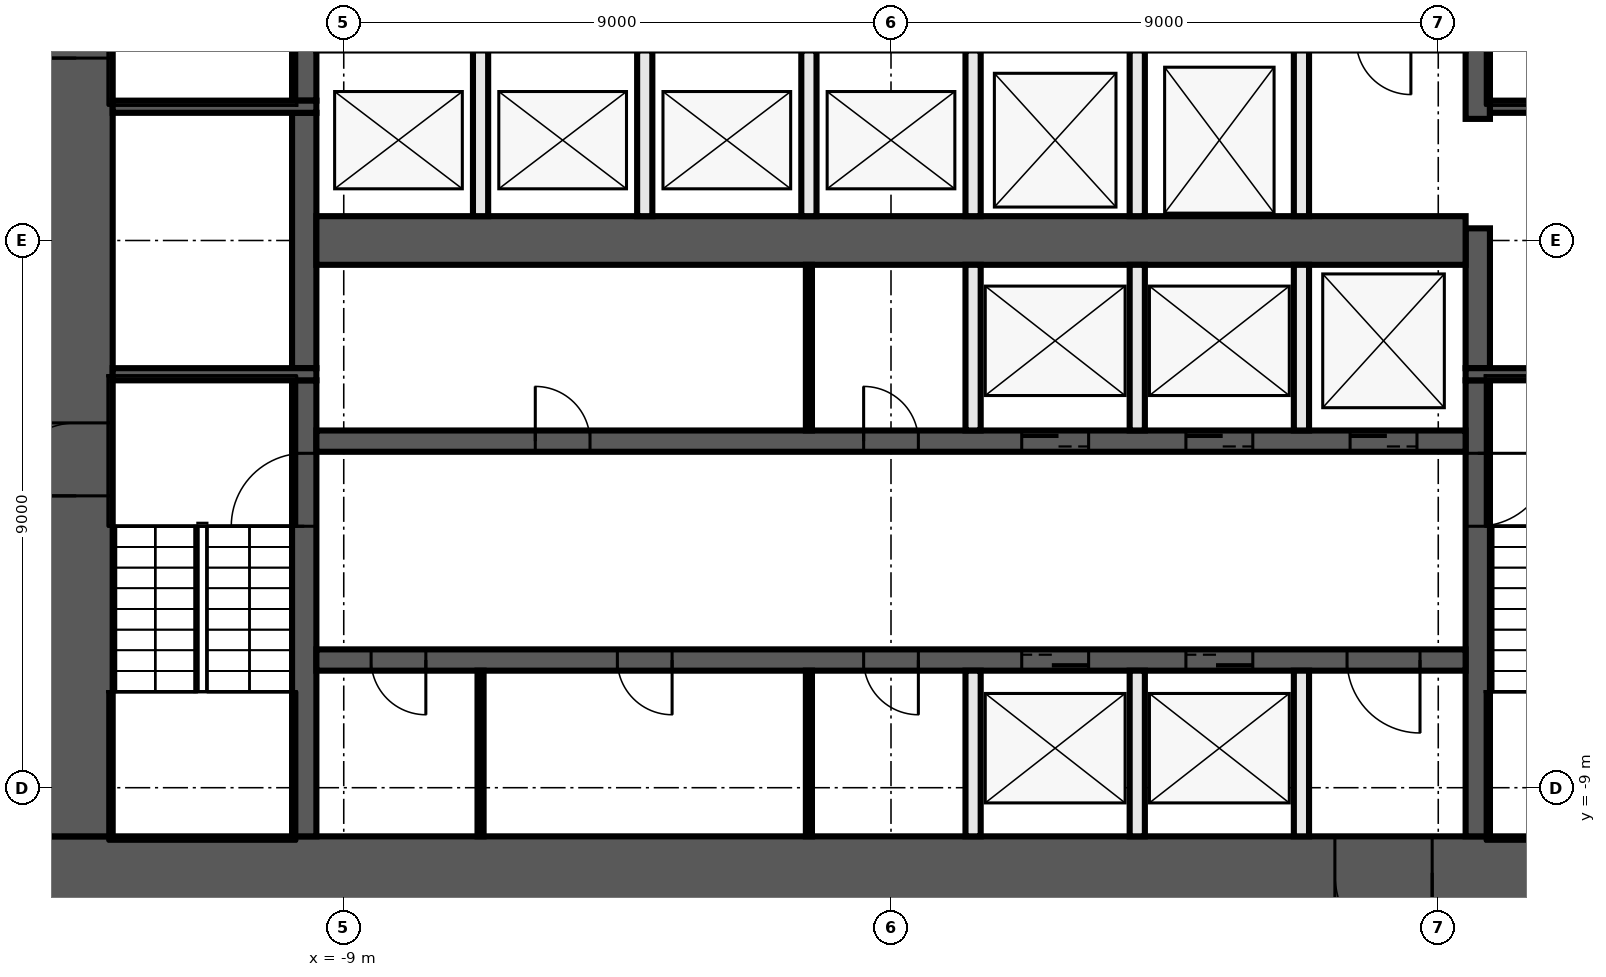
"""IFC4 building model, lengths in metres.
Left out: names, types, materials, properties, quantities, classifications, styles, units other than length and angle.
Written with IfcOpenShell. Run it as: python <this file> out.ifc"""

import sys

from ifc_helpers import new_model, si_unit, direction, frame, frame_2d, origin, place, context, subcontext, project, spatial, rectangle, extrude, element, fill, save


model = new_model("IFC4")
c1 = context("Model", 3, precision=1e-05, world=origin(), true_north=direction((0.0, 1.0)))
c2 = subcontext(c1, "Body", "Model", "MODEL_VIEW")
j1 = project(units=[si_unit("LENGTHUNIT", "METRE"), si_unit("PLANEANGLEUNIT", "RADIAN")], contexts=[c1])
p1 = place(None, origin())
s1 = spatial("IfcSite", under=j1, at=p1, CompositionType="ELEMENT")
p2 = place(p1, origin())
s2 = spatial("IfcBuilding", under=s1, at=p2, CompositionType="ELEMENT")
p3 = place(p2, origin())
s3 = spatial("IfcBuildingStorey", under=s2, at=p3, CompositionType="ELEMENT", Elevation=0.0)
p4 = place(p3, frame((14.0, -10.4, 0.0), z_axis=(0.0, 0.0, 1.0), x_axis=(-1.0, 0.0, 0.0)))
e1 = element("IfcWall", 1, at=p4, inside=s3, PredefinedType="SHEAR", context=c2, shape_type="SweptSolid", body=[
    extrude(rectangle(XDim=28.0, YDim=1.2, at=frame_2d((14.0, 0.0))), origin(), (0.0, 0.0, 1.0), 8.55),
])
p5 = place(p4, frame((5.1, 0.0, 0.0)))
e2 = element("IfcOpeningElement", 2, at=p5, cuts=e1, PredefinedType="OPENING", context=c2, shape_type="SweptSolid", body=[
    extrude(rectangle(XDim=1.6, YDim=2.1, at=frame_2d((0.8, 1.05))), frame((0.0, 0.61, 0.0), z_axis=(0.0, -1.0, 0.0), x_axis=(1.0, 0.0, 0.0)), (0.0, 0.0, 1.0), 1.22),
])
p6 = place(p3, frame((-13.4, -9.8, 0.0), z_axis=(0.0, 0.0, 1.0), x_axis=(0.0, 1.0, 0.0)))
e3 = element("IfcWall", 3, at=p6, inside=s3, PredefinedType="SHEAR", context=c2, shape_type="SweptSolid", body=[
    extrude(rectangle(XDim=19.6, YDim=1.2, at=frame_2d((9.8, 0.0))), origin(), (0.0, 0.0, 1.0), 8.55),
])
p7 = place(p6, frame((12.8, 0.0, 0.0)))
e4 = element("IfcOpeningElement", 4, at=p7, cuts=e3, PredefinedType="OPENING", context=c2, shape_type="SweptSolid", body=[
    extrude(rectangle(XDim=1.2, YDim=2.1, at=frame_2d((0.6, 1.05))), frame((0.0, 0.61, 0.0), z_axis=(0.0, -1.0, 0.0), x_axis=(1.0, 0.0, 0.0)), (0.0, 0.0, 1.0), 1.22),
])
p8 = place(p6, frame((5.6, 0.0, 0.0)))
e5 = element("IfcOpeningElement", 5, at=p8, cuts=e3, PredefinedType="OPENING", context=c2, shape_type="SweptSolid", body=[
    extrude(rectangle(XDim=1.2, YDim=2.1, at=frame_2d((0.6, 1.05))), frame((0.0, 0.61, 0.0), z_axis=(0.0, -1.0, 0.0), x_axis=(1.0, 0.0, 0.0)), (0.0, 0.0, 1.0), 1.22),
])
p9 = place(p3, frame((9.65, -2.3, 0.0), z_axis=(0.0, 0.0, 1.0), x_axis=(0.0, -1.0, 0.0)))
e6 = element("IfcWall", 6, at=p9, inside=s3, PredefinedType="SHEAR", context=c2, shape_type="SweptSolid", body=[
    extrude(rectangle(XDim=7.5, YDim=0.4, at=frame_2d((3.75, 0.0))), origin(), (0.0, 0.0, 1.0), 8.55),
])
p10 = place(p9, frame((1.2, 0.0, 0.0)))
e7 = element("IfcOpeningElement", 7, at=p10, cuts=e6, PredefinedType="OPENING", context=c2, shape_type="SweptSolid", body=[
    extrude(rectangle(XDim=1.2, YDim=2.1, at=frame_2d((0.6, 1.05))), frame((0.0, 0.21, 0.0), z_axis=(0.0, -1.0, 0.0), x_axis=(1.0, 0.0, 0.0)), (0.0, 0.0, 1.0), 0.42),
])
p11 = place(p3, frame((9.65, -2.1, 0.0), z_axis=(0.0, 0.0, 1.0), x_axis=(0.0, 1.0, 0.0)))
e8 = element("IfcWall", 8, at=p11, inside=s3, PredefinedType="SHEAR", context=c2, shape_type="SweptSolid", body=[
    extrude(rectangle(XDim=2.3, YDim=0.4, at=frame_2d((1.15, 0.0))), origin(), (0.0, 0.0, 1.0), 8.55),
])
p12 = place(p3, frame((9.65, 9.8, 0.0), z_axis=(0.0, 0.0, 1.0), x_axis=(0.0, -1.0, 0.0)))
e9 = element("IfcWall", 9, at=p12, inside=s3, PredefinedType="SHEAR", context=c2, shape_type="SweptSolid", body=[
    extrude(rectangle(XDim=7.8, YDim=0.4, at=frame_2d((3.9, 0.0))), origin(), (0.0, 0.0, 1.0), 8.55),
])
p13 = place(p12, frame((5.1, 0.0, 0.0)))
e10 = element("IfcOpeningElement", 10, at=p13, cuts=e9, PredefinedType="OPENING", context=c2, shape_type="SweptSolid", body=[
    extrude(rectangle(XDim=1.2, YDim=2.1, at=frame_2d((0.6, 1.05))), frame((0.0, 0.21, 0.0), z_axis=(0.0, -1.0, 0.0), x_axis=(1.0, 0.0, 0.0)), (0.0, 0.0, 1.0), 0.42),
])
p14 = place(p3, frame((-9.65, -9.8, 0.0), z_axis=(0.0, 0.0, 1.0), x_axis=(0.0, 1.0, 0.0)))
e11 = element("IfcWall", 11, at=p14, inside=s3, PredefinedType="SHEAR", context=c2, shape_type="SweptSolid", body=[
    extrude(rectangle(XDim=7.5, YDim=0.4, at=frame_2d((3.75, 0.0))), origin(), (0.0, 0.0, 1.0), 8.55),
])
p15 = place(p14, frame((5.1, 0.0, 0.0)))
e12 = element("IfcOpeningElement", 12, at=p15, cuts=e11, PredefinedType="OPENING", context=c2, shape_type="SweptSolid", body=[
    extrude(rectangle(XDim=1.2, YDim=2.1, at=frame_2d((0.6, 1.05))), frame((0.0, 0.21, 0.0), z_axis=(0.0, -1.0, 0.0), x_axis=(1.0, 0.0, 0.0)), (0.0, 0.0, 1.0), 0.42),
])
p16 = place(p3, frame((-9.65, -2.1, 0.0), z_axis=(0.0, 0.0, 1.0), x_axis=(0.0, 1.0, 0.0)))
e13 = element("IfcWall", 13, at=p16, inside=s3, PredefinedType="SHEAR", context=c2, shape_type="SweptSolid", body=[
    extrude(rectangle(XDim=4.2, YDim=0.4, at=frame_2d((2.1, 0.0))), origin(), (0.0, 0.0, 1.0), 8.55),
])
p17 = place(p3, frame((-9.65, 2.3, 0.0), z_axis=(0.0, 0.0, 1.0), x_axis=(0.0, 1.0, 0.0)))
e14 = element("IfcWall", 14, at=p17, inside=s3, PredefinedType="SHEAR", context=c2, shape_type="SweptSolid", body=[
    extrude(rectangle(XDim=7.5, YDim=0.4, at=frame_2d((3.75, 0.0))), origin(), (0.0, 0.0, 1.0), 8.55),
])
p18 = place(p17, frame((1.2, 0.0, 0.0)))
e15 = element("IfcOpeningElement", 15, at=p18, cuts=e14, PredefinedType="OPENING", context=c2, shape_type="SweptSolid", body=[
    extrude(rectangle(XDim=1.2, YDim=2.1, at=frame_2d((0.6, 1.05))), frame((0.0, 0.21, 0.0), z_axis=(0.0, -1.0, 0.0), x_axis=(1.0, 0.0, 0.0)), (0.0, 0.0, 1.0), 0.42),
])
p19 = place(p3, frame((9.85, 2.2, 0.0), z_axis=(0.0, 0.0, 1.0), x_axis=(1.0, 0.0, 0.0)))
e16 = element("IfcWall", 16, at=p19, inside=s3, PredefinedType="SHEAR", context=c2, shape_type="SweptSolid", body=[
    extrude(rectangle(XDim=2.95, YDim=0.2, at=frame_2d((1.475, 0.0))), origin(), (0.0, 0.0, 1.0), 8.55),
])
for number, where, z_axis, x_axis in (
    (17, (-9.45, 2.2, 0.0), (0.0, 0.0, 1.0), (-1.0, 0.0, 0.0)),
    (18, (9.45, -2.2, 0.0), (0.0, 0.0, 1.0), (1.0, 0.0, 0.0)),
    (19, (-9.45, -2.2, 0.0), (0.0, 0.0, 1.0), (-1.0, 0.0, 0.0)),
):
    element("IfcWall", number, at=place(p3, frame(where, z_axis=z_axis, x_axis=x_axis)), inside=s3, PredefinedType="SHEAR", context=c2, shape_type="SweptSolid", body=[
        extrude(rectangle(XDim=3.35, YDim=0.2, at=frame_2d((1.675, 0.0))), origin(), (0.0, 0.0, 1.0), 8.55),
    ])
p20 = place(p3, frame((-9.45, -3.3, 0.0), z_axis=(0.0, 0.0, 1.0), x_axis=(1.0, 0.0, 0.0)))
e20 = element("IfcWall", 20, at=p20, inside=s3, PredefinedType="SHEAR", context=c2, shape_type="SweptSolid", body=[
    extrude(rectangle(XDim=18.9, YDim=0.35, at=frame_2d((9.45, 0.0))), origin(), (0.0, 0.0, 1.0), 8.55),
])
p21 = place(p20, frame((11.6, 0.0, 0.0)))
e21 = element("IfcOpeningElement", 21, at=p21, cuts=e20, PredefinedType="OPENING", context=c2, shape_type="SweptSolid", body=[
    extrude(rectangle(XDim=1.1, YDim=2.1, at=frame_2d((0.55, 1.05))), frame((0.0, 0.185, 0.0), z_axis=(0.0, -1.0, 0.0), x_axis=(1.0, 0.0, 0.0)), (0.0, 0.0, 1.0), 0.37),
])
p22 = place(p20, frame((14.3, 0.0, 0.0)))
e22 = element("IfcOpeningElement", 22, at=p22, cuts=e20, PredefinedType="OPENING", context=c2, shape_type="SweptSolid", body=[
    extrude(rectangle(XDim=1.1, YDim=2.1, at=frame_2d((0.55, 1.05))), frame((0.0, 0.185, 0.0), z_axis=(0.0, -1.0, 0.0), x_axis=(1.0, 0.0, 0.0)), (0.0, 0.0, 1.0), 0.37),
])
p23 = place(p20, frame((17.0, 0.0, 0.0)))
e23 = element("IfcOpeningElement", 23, at=p23, cuts=e20, PredefinedType="OPENING", context=c2, shape_type="SweptSolid", body=[
    extrude(rectangle(XDim=1.1, YDim=2.1, at=frame_2d((0.55, 1.05))), frame((0.0, 0.185, 0.0), z_axis=(0.0, -1.0, 0.0), x_axis=(1.0, 0.0, 0.0)), (0.0, 0.0, 1.0), 0.37),
])
p24 = place(p20, frame((3.6, 0.0, 0.0)))
e24 = element("IfcOpeningElement", 24, at=p24, cuts=e20, PredefinedType="OPENING", context=c2, shape_type="SweptSolid", body=[
    extrude(rectangle(XDim=0.9, YDim=2.1, at=frame_2d((0.45, 1.05))), frame((0.0, 0.185, 0.0), z_axis=(0.0, -1.0, 0.0), x_axis=(1.0, 0.0, 0.0)), (0.0, 0.0, 1.0), 0.37),
])
p25 = place(p20, frame((9.0, 0.0, 0.0)))
e25 = element("IfcOpeningElement", 25, at=p25, cuts=e20, PredefinedType="OPENING", context=c2, shape_type="SweptSolid", body=[
    extrude(rectangle(XDim=0.9, YDim=2.1, at=frame_2d((0.45, 1.05))), frame((0.0, 0.185, 0.0), z_axis=(0.0, -1.0, 0.0), x_axis=(1.0, 0.0, 0.0)), (0.0, 0.0, 1.0), 0.37),
])
p26 = place(p3, frame((9.45, -6.9, 0.0), z_axis=(0.0, 0.0, 1.0), x_axis=(-1.0, 0.0, 0.0)))
e26 = element("IfcWall", 26, at=p26, inside=s3, PredefinedType="SHEAR", context=c2, shape_type="SweptSolid", body=[
    extrude(rectangle(XDim=18.9, YDim=0.35, at=frame_2d((9.45, 0.0))), origin(), (0.0, 0.0, 1.0), 8.55),
])
p27 = place(p26, frame((6.2, 0.0, 0.0)))
e27 = element("IfcOpeningElement", 27, at=p27, cuts=e26, PredefinedType="OPENING", context=c2, shape_type="SweptSolid", body=[
    extrude(rectangle(XDim=1.1, YDim=2.1, at=frame_2d((0.55, 1.05))), frame((0.0, 0.185, 0.0), z_axis=(0.0, -1.0, 0.0), x_axis=(1.0, 0.0, 0.0)), (0.0, 0.0, 1.0), 0.37),
])
p28 = place(p26, frame((3.5, 0.0, 0.0)))
e28 = element("IfcOpeningElement", 28, at=p28, cuts=e26, PredefinedType="OPENING", context=c2, shape_type="SweptSolid", body=[
    extrude(rectangle(XDim=1.1, YDim=2.1, at=frame_2d((0.55, 1.05))), frame((0.0, 0.185, 0.0), z_axis=(0.0, -1.0, 0.0), x_axis=(1.0, 0.0, 0.0)), (0.0, 0.0, 1.0), 0.37),
])
p29 = place(p26, frame((0.75, 0.0, 0.0)))
e29 = element("IfcOpeningElement", 29, at=p29, cuts=e26, PredefinedType="OPENING", context=c2, shape_type="SweptSolid", body=[
    extrude(rectangle(XDim=1.2, YDim=2.1, at=frame_2d((0.6, 1.05))), frame((0.0, 0.185, 0.0), z_axis=(0.0, -1.0, 0.0), x_axis=(1.0, 0.0, 0.0)), (0.0, 0.0, 1.0), 0.37),
])
p30 = place(p26, frame((17.1, 0.0, 0.0)))
e30 = element("IfcOpeningElement", 30, at=p30, cuts=e26, PredefinedType="OPENING", context=c2, shape_type="SweptSolid", body=[
    extrude(rectangle(XDim=0.9, YDim=2.1, at=frame_2d((0.45, 1.05))), frame((0.0, 0.185, 0.0), z_axis=(0.0, -1.0, 0.0), x_axis=(1.0, 0.0, 0.0)), (0.0, 0.0, 1.0), 0.37),
])
p31 = place(p26, frame((13.05, 0.0, 0.0)))
e31 = element("IfcOpeningElement", 31, at=p31, cuts=e26, PredefinedType="OPENING", context=c2, shape_type="SweptSolid", body=[
    extrude(rectangle(XDim=0.9, YDim=2.1, at=frame_2d((0.45, 1.05))), frame((0.0, 0.185, 0.0), z_axis=(0.0, -1.0, 0.0), x_axis=(1.0, 0.0, 0.0)), (0.0, 0.0, 1.0), 0.37),
])
p32 = place(p26, frame((9.0, 0.0, 0.0)))
e32 = element("IfcOpeningElement", 32, at=p32, cuts=e26, PredefinedType="OPENING", context=c2, shape_type="SweptSolid", body=[
    extrude(rectangle(XDim=0.9, YDim=2.1, at=frame_2d((0.45, 1.05))), frame((0.0, 0.185, 0.0), z_axis=(0.0, -1.0, 0.0), x_axis=(1.0, 0.0, 0.0)), (0.0, 0.0, 1.0), 0.37),
])
p33 = place(p3, frame((-9.45, 0.0, 0.0), z_axis=(0.0, 0.0, 1.0), x_axis=(1.0, 0.0, 0.0)))
e33 = element("IfcWall", 33, at=p33, inside=s3, PredefinedType="SHEAR", context=c2, shape_type="SweptSolid", body=[
    extrude(rectangle(XDim=18.9, YDim=0.8, at=frame_2d((9.45, 0.0))), origin(), (0.0, 0.0, 1.0), 8.55),
])
for number, where, z_axis, x_axis in (
    (34, (6.75, -9.8, 0.0), (0.0, 0.0, 1.0), (0.0, 1.0, 0.0)),
    (35, (6.75, -3.125, 0.0), (0.0, 0.0, 1.0), (0.0, 1.0, 0.0)),
    (36, (6.75, 0.4, 0.0), (0.0, 0.0, 1.0), (0.0, 1.0, 0.0)),
    (37, (4.05, -9.8, 0.0), (0.0, 0.0, 1.0), (0.0, 1.0, 0.0)),
    (38, (4.05, -3.125, 0.0), (0.0, 0.0, 1.0), (0.0, 1.0, 0.0)),
    (39, (4.05, 0.4, 0.0), (0.0, 0.0, 1.0), (0.0, 1.0, 0.0)),
    (40, (1.35, -9.8, 0.0), (0.0, 0.0, 1.0), (0.0, 1.0, 0.0)),
    (41, (1.35, -3.125, 0.0), (0.0, 0.0, 1.0), (0.0, 1.0, 0.0)),
    (42, (1.35, 0.4, 0.0), (0.0, 0.0, 1.0), (0.0, 1.0, 0.0)),
):
    element("IfcWall", number, at=place(p3, frame(where, z_axis=z_axis, x_axis=x_axis)), inside=s3, PredefinedType="SOLIDWALL", context=c2, shape_type="SweptSolid", body=[
        extrude(rectangle(XDim=2.725, YDim=0.25, at=frame_2d((1.363, 0.0))), origin(), (0.0, 0.0, 1.0), 8.55),
    ])
for number, where, z_axis, x_axis in (
    (43, (-1.35, -9.8, 0.0), (0.0, 0.0, 1.0), (0.0, 1.0, 0.0)),
    (44, (-1.35, -3.125, 0.0), (0.0, 0.0, 1.0), (0.0, 1.0, 0.0)),
):
    element("IfcWall", number, at=place(p3, frame(where, z_axis=z_axis, x_axis=x_axis)), inside=s3, PredefinedType="PARTITIONING", context=c2, shape_type="SweptSolid", body=[
        extrude(rectangle(XDim=2.725, YDim=0.1, at=frame_2d((1.363, 0.0))), origin(), (0.0, 0.0, 1.0), 8.55),
    ])
for number, where, z_axis, x_axis in (
    (45, (-1.35, 0.4, 0.0), (0.0, 0.0, 1.0), (0.0, 1.0, 0.0)),
    (46, (-4.05, 0.4, 0.0), (0.0, 0.0, 1.0), (0.0, 1.0, 0.0)),
):
    element("IfcWall", number, at=place(p3, frame(where, z_axis=z_axis, x_axis=x_axis)), inside=s3, PredefinedType="SOLIDWALL", context=c2, shape_type="SweptSolid", body=[
        extrude(rectangle(XDim=2.725, YDim=0.25, at=frame_2d((1.363, 0.0))), origin(), (0.0, 0.0, 1.0), 8.55),
    ])
p34 = place(p3, frame((-6.75, -9.8, 0.0), z_axis=(0.0, 0.0, 1.0), x_axis=(0.0, 1.0, 0.0)))
e47 = element("IfcWall", 47, at=p34, inside=s3, PredefinedType="PARTITIONING", context=c2, shape_type="SweptSolid", body=[
    extrude(rectangle(XDim=2.725, YDim=0.1, at=frame_2d((1.363, 0.0))), origin(), (0.0, 0.0, 1.0), 8.55),
])
p35 = place(p3, frame((-6.75, 0.4, 0.0), z_axis=(0.0, 0.0, 1.0), x_axis=(0.0, 1.0, 0.0)))
e48 = element("IfcWall", 48, at=p35, inside=s3, PredefinedType="SOLIDWALL", context=c2, shape_type="SweptSolid", body=[
    extrude(rectangle(XDim=2.725, YDim=0.25, at=frame_2d((1.363, 0.0))), origin(), (0.0, 0.0, 1.0), 8.55),
])
p36 = place(p21, origin())
e49 = element("IfcDoor", 49, at=p36, inside=s3, OperationType="DOUBLE_DOOR_SLIDING", PredefinedType="DOOR", context=c2, shape_type="SweptSolid", body=[
    extrude(rectangle(XDim=1.1, YDim=2.1, at=frame_2d((0.55, 1.05))), frame((0.0, 0.025, 0.0), z_axis=(0.0, -1.0, 0.0), x_axis=(1.0, 0.0, 0.0)), (0.0, 0.0, 1.0), 0.05),
])
fill(e21, e49)
p37 = place(p22, origin())
e50 = element("IfcDoor", 50, at=p37, inside=s3, OperationType="DOUBLE_DOOR_SLIDING", PredefinedType="DOOR", context=c2, shape_type="SweptSolid", body=[
    extrude(rectangle(XDim=1.1, YDim=2.1, at=frame_2d((0.55, 1.05))), frame((0.0, 0.025, 0.0), z_axis=(0.0, -1.0, 0.0), x_axis=(1.0, 0.0, 0.0)), (0.0, 0.0, 1.0), 0.05),
])
fill(e22, e50)
p38 = place(p23, origin())
e51 = element("IfcDoor", 51, at=p38, inside=s3, OperationType="DOUBLE_DOOR_SLIDING", PredefinedType="DOOR", context=c2, shape_type="SweptSolid", body=[
    extrude(rectangle(XDim=1.1, YDim=2.1, at=frame_2d((0.55, 1.05))), frame((0.0, 0.025, 0.0), z_axis=(0.0, -1.0, 0.0), x_axis=(1.0, 0.0, 0.0)), (0.0, 0.0, 1.0), 0.05),
])
fill(e23, e51)
p39 = place(p27, origin())
e52 = element("IfcDoor", 52, at=p39, inside=s3, OperationType="DOUBLE_DOOR_SLIDING", PredefinedType="DOOR", context=c2, shape_type="SweptSolid", body=[
    extrude(rectangle(XDim=1.1, YDim=2.1, at=frame_2d((0.55, 1.05))), frame((0.0, 0.025, 0.0), z_axis=(0.0, -1.0, 0.0), x_axis=(1.0, 0.0, 0.0)), (0.0, 0.0, 1.0), 0.05),
])
fill(e27, e52)
p40 = place(p28, origin())
e53 = element("IfcDoor", 53, at=p40, inside=s3, OperationType="DOUBLE_DOOR_SLIDING", PredefinedType="DOOR", context=c2, shape_type="SweptSolid", body=[
    extrude(rectangle(XDim=1.1, YDim=2.1, at=frame_2d((0.55, 1.05))), frame((0.0, 0.025, 0.0), z_axis=(0.0, -1.0, 0.0), x_axis=(1.0, 0.0, 0.0)), (0.0, 0.0, 1.0), 0.05),
])
fill(e28, e53)
p41 = place(p5, origin())
e54 = element("IfcDoor", 54, at=p41, inside=s3, OperationType="DOUBLE_DOOR_SINGLE_SWING", PredefinedType="DOOR", context=c2, shape_type="SweptSolid", body=[
    extrude(rectangle(XDim=1.6, YDim=2.1, at=frame_2d((0.8, 1.05))), frame((0.0, 0.025, 0.0), z_axis=(0.0, -1.0, 0.0), x_axis=(1.0, 0.0, 0.0)), (0.0, 0.0, 1.0), 0.05),
])
fill(e2, e54)
p42 = place(p29, origin())
e55 = element("IfcDoor", 55, at=p42, inside=s3, OperationType="SINGLE_SWING_LEFT", PredefinedType="DOOR", context=c2, shape_type="SweptSolid", body=[
    extrude(rectangle(XDim=1.2, YDim=2.1, at=frame_2d((0.6, 1.05))), frame((0.0, 0.025, 0.0), z_axis=(0.0, -1.0, 0.0), x_axis=(1.0, 0.0, 0.0)), (0.0, 0.0, 1.0), 0.05),
])
fill(e29, e55)
p43 = place(p24, origin())
e56 = element("IfcDoor", 56, at=p43, inside=s3, OperationType="SINGLE_SWING_RIGHT", PredefinedType="DOOR", context=c2, shape_type="SweptSolid", body=[
    extrude(rectangle(XDim=0.9, YDim=2.1, at=frame_2d((0.45, 1.05))), frame((0.0, 0.025, 0.0), z_axis=(0.0, -1.0, 0.0), x_axis=(1.0, 0.0, 0.0)), (0.0, 0.0, 1.0), 0.05),
])
fill(e24, e56)
p44 = place(p25, origin())
e57 = element("IfcDoor", 57, at=p44, inside=s3, OperationType="SINGLE_SWING_LEFT", PredefinedType="DOOR", context=c2, shape_type="SweptSolid", body=[
    extrude(rectangle(XDim=0.9, YDim=2.1, at=frame_2d((0.45, 1.05))), frame((0.0, 0.025, 0.0), z_axis=(0.0, -1.0, 0.0), x_axis=(1.0, 0.0, 0.0)), (0.0, 0.0, 1.0), 0.05),
])
fill(e25, e57)
p45 = place(p30, origin())
e58 = element("IfcDoor", 58, at=p45, inside=s3, OperationType="SINGLE_SWING_RIGHT", PredefinedType="DOOR", context=c2, shape_type="SweptSolid", body=[
    extrude(rectangle(XDim=0.9, YDim=2.1, at=frame_2d((0.45, 1.05))), frame((0.0, 0.025, 0.0), z_axis=(0.0, -1.0, 0.0), x_axis=(1.0, 0.0, 0.0)), (0.0, 0.0, 1.0), 0.05),
])
fill(e30, e58)
p46 = place(p31, origin())
e59 = element("IfcDoor", 59, at=p46, inside=s3, OperationType="SINGLE_SWING_LEFT", PredefinedType="DOOR", context=c2, shape_type="SweptSolid", body=[
    extrude(rectangle(XDim=0.9, YDim=2.1, at=frame_2d((0.45, 1.05))), frame((0.0, 0.025, 0.0), z_axis=(0.0, -1.0, 0.0), x_axis=(1.0, 0.0, 0.0)), (0.0, 0.0, 1.0), 0.05),
])
fill(e31, e59)
p47 = place(p32, origin())
e60 = element("IfcDoor", 60, at=p47, inside=s3, OperationType="SINGLE_SWING_RIGHT", PredefinedType="DOOR", context=c2, shape_type="SweptSolid", body=[
    extrude(rectangle(XDim=0.9, YDim=2.1, at=frame_2d((0.45, 1.05))), frame((0.0, 0.025, 0.0), z_axis=(0.0, -1.0, 0.0), x_axis=(1.0, 0.0, 0.0)), (0.0, 0.0, 1.0), 0.05),
])
fill(e32, e60)
p48 = place(p10, origin())
e61 = element("IfcDoor", 61, at=p48, inside=s3, OperationType="SINGLE_SWING_RIGHT", PredefinedType="DOOR", context=c2, shape_type="SweptSolid", body=[
    extrude(rectangle(XDim=1.2, YDim=2.1, at=frame_2d((0.6, 1.05))), frame((0.0, 0.025, 0.0), z_axis=(0.0, -1.0, 0.0), x_axis=(1.0, 0.0, 0.0)), (0.0, 0.0, 1.0), 0.05),
])
fill(e7, e61)
p49 = place(p15, origin())
e62 = element("IfcDoor", 62, at=p49, inside=s3, OperationType="SINGLE_SWING_LEFT", PredefinedType="DOOR", context=c2, shape_type="SweptSolid", body=[
    extrude(rectangle(XDim=1.2, YDim=2.1, at=frame_2d((0.6, 1.05))), frame((0.0, 0.025, 0.0), z_axis=(0.0, -1.0, 0.0), x_axis=(1.0, 0.0, 0.0)), (0.0, 0.0, 1.0), 0.05),
])
fill(e12, e62)
p50 = place(p7, origin())
e63 = element("IfcDoor", 63, at=p50, inside=s3, OperationType="SINGLE_SWING_LEFT", PredefinedType="DOOR", context=c2, shape_type="SweptSolid", body=[
    extrude(rectangle(XDim=1.2, YDim=2.1, at=frame_2d((0.6, 1.05))), frame((0.0, 0.025, 0.0), z_axis=(0.0, -1.0, 0.0), x_axis=(1.0, 0.0, 0.0)), (0.0, 0.0, 1.0), 0.05),
])
fill(e4, e63)
p51 = place(p8, origin())
e64 = element("IfcDoor", 64, at=p51, inside=s3, OperationType="SINGLE_SWING_LEFT", PredefinedType="DOOR", context=c2, shape_type="SweptSolid", body=[
    extrude(rectangle(XDim=1.2, YDim=2.1, at=frame_2d((0.6, 1.05))), frame((0.0, 0.025, 0.0), z_axis=(0.0, -1.0, 0.0), x_axis=(1.0, 0.0, 0.0)), (0.0, 0.0, 1.0), 0.05),
])
fill(e5, e64)
save(model, sys.argv[1])
